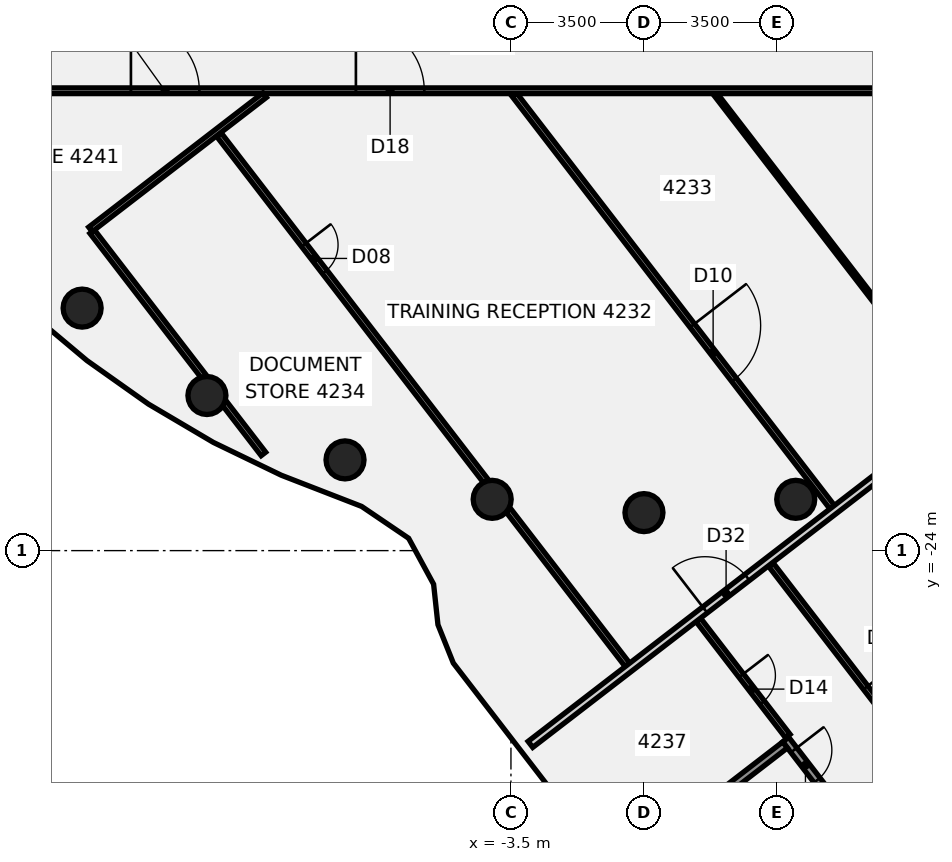
"""IFC4 building model, lengths in metres.
Left out: names, types, materials, properties, quantities, classifications, styles, units other than length and angle.
Written with IfcOpenShell. Run it as: python <this file> out.ifc"""

import sys

from ifc_helpers import new_model, si_unit, direction, frame, frame_2d, origin, origin_2d, place, context, subcontext, project, spatial, rectangle, circle, extrude, element, fill, save


model = new_model("IFC4")
c1 = context("Model", 3, precision=1e-05, world=origin(), true_north=direction((0.0, 1.0)))
c2 = subcontext(c1, "Body", "Model", "MODEL_VIEW")
j1 = project(units=[si_unit("LENGTHUNIT", "METRE"), si_unit("PLANEANGLEUNIT", "RADIAN")], contexts=[c1])
p1 = place(None, origin())
s1 = spatial("IfcSite", under=j1, at=p1, CompositionType="ELEMENT")
p2 = place(p1, origin())
s2 = spatial("IfcBuilding", under=s1, at=p2, CompositionType="ELEMENT")
p3 = place(p2, frame((0.0, 0.0, 170.5)))
s3 = spatial("IfcBuildingStorey", under=s2, at=p3, CompositionType="ELEMENT", Elevation=170.5)
for number, where, z_axis, x_axis in (
    (1, (-14.784, -17.619, -0.14), (0.0, 0.0, 1.0), (1.0, 0.0, 0.0)),
    (2, (-11.5, -19.919, -0.14), (0.0, 0.0, 1.0), (1.0, 0.0, 0.0)),
    (3, (-7.866, -21.613, -0.14), (0.0, 0.0, 1.0), (1.0, 0.0, 0.0)),
    (4, (-3.994, -22.651, -0.14), (0.0, 0.0, 1.0), (1.0, 0.0, 0.0)),
    (5, (0.0, -23.0, -0.14), (0.0, 0.0, 1.0), (1.0, 0.0, 0.0)),
    (6, (3.994, -22.651, -0.14), (0.0, 0.0, 1.0), (1.0, 0.0, 0.0)),
):
    element("IfcColumn", number, at=place(p3, frame(where, z_axis=z_axis, x_axis=x_axis)), inside=s3, PredefinedType="COLUMN", context=c2, shape_type="SweptSolid", body=[
        extrude(circle(Radius=0.5, at=origin_2d()), origin(), (0.0, 0.0, 1.0), 3.75),
    ])
p4 = place(p3, frame((-14.519, -15.607, 0.0), z_axis=(0.0, 0.0, 1.0), x_axis=(0.610346471548, -0.792134574848, 0.0)))
e7 = element("IfcWall", 7, at=p4, inside=s3, PredefinedType="PARTITIONING", context=c2, shape_type="SweptSolid", body=[
    extrude(rectangle(XDim=4.824, YDim=0.15, at=frame_2d((2.412, 0.0))), origin(), (0.0, 0.0, 1.0), 3.01),
])
p5 = place(p3, frame((-11.044, -20.118, 0.0), z_axis=(0.0, 0.0, 1.0), x_axis=(0.610360453682, -0.792123801297, 0.0)))
e8 = element("IfcWall", 8, at=p5, inside=s3, PredefinedType="PARTITIONING", context=c2, shape_type="SweptSolid", body=[
    extrude(rectangle(XDim=1.688, YDim=0.15, at=frame_2d((0.844, 0.0))), origin(), (0.0, 0.0, 1.0), 3.01),
])
p6 = place(p3, frame((-11.189, -13.048, 0.0), z_axis=(0.0, 0.0, 1.0), x_axis=(0.610349031446, -0.792132602418, 0.0)))
e9 = element("IfcWall", 9, at=p6, inside=s3, PredefinedType="PARTITIONING", context=c2, shape_type="SweptSolid", body=[
    extrude(rectangle(XDim=11.531, YDim=0.15, at=frame_2d((5.766, 0.0))), origin(), (0.0, 0.0, 1.0), 3.01),
])
p7 = place(p6, frame((3.67, 0.0, 0.0)))
e10 = element("IfcOpeningElement", 10, at=p7, cuts=e9, PredefinedType="OPENING", context=c2, shape_type="SweptSolid", body=[
    extrude(rectangle(XDim=0.9, YDim=2.1, at=frame_2d((0.45, 1.05))), frame((0.0, 0.085, 0.0), z_axis=(0.0, -1.0, 0.0), x_axis=(1.0, 0.0, 0.0)), (0.0, 0.0, 1.0), 0.17),
])
p8 = place(p3, frame((-3.576, -22.929, 0.0), z_axis=(0.0, 0.0, 1.0), x_axis=(0.610318133702, -0.792156408593, 0.0)))
e11 = element("IfcWall", 11, at=p8, inside=s3, PredefinedType="PARTITIONING", context=c2, shape_type="SweptSolid", body=[
    extrude(rectangle(XDim=5.146, YDim=0.15, at=frame_2d((2.573, 0.0))), origin(), (0.0, 0.0, 1.0), 3.01),
])
p9 = place(p3, frame((-3.411, -12.003, 0.0), z_axis=(0.0, 0.0, 1.0), x_axis=(0.610364170435, -0.792120937388, 0.0)))
e12 = element("IfcWall", 12, at=p9, inside=s3, PredefinedType="PARTITIONING", context=c2, shape_type="SweptSolid", body=[
    extrude(rectangle(XDim=13.701, YDim=0.15, at=frame_2d((6.851, 0.0))), origin(), (0.0, 0.0, 1.0), 3.01),
])
p10 = place(p9, frame((7.67, 0.0, 0.0)))
e13 = element("IfcOpeningElement", 13, at=p10, cuts=e12, PredefinedType="OPENING", context=c2, shape_type="SweptSolid", body=[
    extrude(rectangle(XDim=1.8, YDim=2.1, at=frame_2d((0.9, 1.05))), frame((0.0, 0.085, 0.0), z_axis=(0.0, -1.0, 0.0), x_axis=(1.0, 0.0, 0.0)), (0.0, 0.0, 1.0), 0.17),
])
p11 = place(p3, frame((1.43, -25.822, 0.0), z_axis=(0.0, 0.0, 1.0), x_axis=(0.610373930516, -0.792113416719, 0.0)))
e14 = element("IfcWall", 14, at=p11, inside=s3, PredefinedType="PARTITIONING", context=c2, shape_type="SweptSolid", body=[
    extrude(rectangle(XDim=3.859, YDim=0.15, at=frame_2d((1.93, 0.0))), origin(), (0.0, 0.0, 1.0), 3.01),
])
p12 = place(p11, frame((1.85, 0.0, 0.0)))
e15 = element("IfcOpeningElement", 15, at=p12, cuts=e14, PredefinedType="OPENING", context=c2, shape_type="SweptSolid", body=[
    extrude(rectangle(XDim=0.9, YDim=2.1, at=frame_2d((0.45, 1.05))), frame((0.0, 0.085, 0.0), z_axis=(0.0, -1.0, 0.0), x_axis=(1.0, 0.0, 0.0)), (0.0, 0.0, 1.0), 0.17),
])
p13 = place(p3, frame((1.879, -11.987, 0.0), z_axis=(0.0, 0.0, 1.0), x_axis=(0.610355549793, -0.792127579899, 0.0)))
e16 = element("IfcWall", 16, at=p13, inside=s3, PredefinedType="PARTITIONING", context=c2, shape_type="SweptSolid", body=[
    extrude(rectangle(XDim=13.994, YDim=0.1, at=frame_2d((6.997, 0.0))), origin(), (0.0, 0.0, 1.0), 3.01),
])
p14 = place(p3, frame((3.343, -24.373, 0.0), z_axis=(0.0, 0.0, 1.0), x_axis=(0.6103058516, -0.792165871205, 0.0)))
e17 = element("IfcWall", 17, at=p14, inside=s3, PredefinedType="PARTITIONING", context=c2, shape_type="SweptSolid", body=[
    extrude(rectangle(XDim=13.3, YDim=0.15, at=frame_2d((6.65, 0.0))), origin(), (0.0, 0.0, 1.0), 3.01),
])
p15 = place(p14, frame((4.08, 0.0, 0.0)))
e18 = element("IfcOpeningElement", 18, at=p15, cuts=e17, PredefinedType="OPENING", context=c2, shape_type="SweptSolid", body=[
    extrude(rectangle(XDim=1.8, YDim=2.1, at=frame_2d((0.9, 1.05))), frame((0.0, 0.085, 0.0), z_axis=(0.0, -1.0, 0.0), x_axis=(1.0, 0.0, 0.0)), (0.0, 0.0, 1.0), 0.17),
])
p16 = place(p3, frame((-17.1, -11.9, 0.0), z_axis=(0.0, 0.0, 1.0), x_axis=(1.0, 0.0, 0.0)))
e19 = element("IfcWall", 19, at=p16, inside=s3, PredefinedType="PARTITIONING", context=c2, shape_type="SweptSolid", body=[
    extrude(rectangle(XDim=34.165, YDim=0.15, at=frame_2d((17.083, 0.0))), origin(), (0.0, 0.0, 1.0), 3.01),
])
p17 = place(p16, frame((9.52, 0.0, 0.0)))
e20 = element("IfcOpeningElement", 20, at=p17, cuts=e19, PredefinedType="OPENING", context=c2, shape_type="SweptSolid", body=[
    extrude(rectangle(XDim=1.8, YDim=2.1, at=frame_2d((0.9, 1.05))), frame((0.0, 0.085, 0.0), z_axis=(0.0, -1.0, 0.0), x_axis=(1.0, 0.0, 0.0)), (0.0, 0.0, 1.0), 0.17),
])
p18 = place(p16, frame((3.6, 0.0, 0.0)))
e21 = element("IfcOpeningElement", 21, at=p18, cuts=e19, PredefinedType="OPENING", context=c2, shape_type="SweptSolid", body=[
    extrude(rectangle(XDim=1.8, YDim=2.1, at=frame_2d((0.9, 1.05))), frame((0.0, 0.085, 0.0), z_axis=(0.0, -1.0, 0.0), x_axis=(1.0, 0.0, 0.0)), (0.0, 0.0, 1.0), 0.17),
])
p19 = place(p16, frame((23.862, 0.0, 0.0)))
e22 = element("IfcOpeningElement", 22, at=p19, cuts=e19, PredefinedType="OPENING", context=c2, shape_type="SweptSolid", body=[
    extrude(rectangle(XDim=1.8, YDim=2.1, at=frame_2d((0.9, 1.05))), frame((0.0, 0.085, 0.0), z_axis=(0.0, -1.0, 0.0), x_axis=(1.0, 0.0, 0.0)), (0.0, 0.0, 1.0), 0.17),
])
p20 = place(p3, frame((-14.565, -15.548, 0.0), z_axis=(0.0, 0.0, 1.0), x_axis=(0.792167406266, 0.610303859114, 0.0)))
e23 = element("IfcWall", 23, at=p20, inside=s3, PredefinedType="PARTITIONING", context=c2, shape_type="SweptSolid", body=[
    extrude(rectangle(XDim=5.787, YDim=0.15, at=frame_2d((2.894, 0.0))), origin(), (0.0, 0.0, 1.0), 3.01),
])
p21 = place(p3, frame((-2.988, -29.099, 0.0), z_axis=(0.0, 0.0, 1.0), x_axis=(0.792235021712, 0.610216084983, 0.0)))
e24 = element("IfcWall", 24, at=p21, inside=s3, PredefinedType="PARTITIONING", context=c2, shape_type="SweptSolid", body=[
    extrude(rectangle(XDim=14.239, YDim=0.2, at=frame_2d((7.12, 0.0))), origin(), (0.0, 0.0, 1.0), 3.01),
])
p22 = place(p21, frame((5.799, 0.0, 0.0)))
e25 = element("IfcOpeningElement", 25, at=p22, cuts=e24, PredefinedType="OPENING", context=c2, shape_type="SweptSolid", body=[
    extrude(rectangle(XDim=1.4, YDim=2.1, at=frame_2d((0.7, 1.05))), frame((0.0, 0.11, 0.0), z_axis=(0.0, -1.0, 0.0), x_axis=(1.0, 0.0, 0.0)), (0.0, 0.0, 1.0), 0.22),
])
p23 = place(p3, frame((3.731, -28.972, -0.14), z_axis=(0.0, 0.0, 1.0), x_axis=(0.610321648921, -0.792153700274, 0.0)))
e26 = element("IfcWall", 26, at=p23, inside=s3, PredefinedType="SHEAR", context=c2, shape_type="SweptSolid", body=[
    extrude(rectangle(XDim=6.7, YDim=0.2, at=frame_2d((3.35, 0.0))), origin(), (0.0, 0.0, 1.0), 3.15),
])
p24 = place(p23, frame((0.35, 0.0, 0.0)))
e27 = element("IfcOpeningElement", 27, at=p24, cuts=e26, PredefinedType="OPENING", context=c2, shape_type="SweptSolid", body=[
    extrude(rectangle(XDim=1.0, YDim=2.1, at=frame_2d((0.5, 1.05))), frame((0.0, 0.11, 0.0), z_axis=(0.0, -1.0, 0.0), x_axis=(1.0, 0.0, 0.0)), (0.0, 0.0, 1.0), 0.22),
])
p25 = place(p3, frame((1.177, -31.065, -0.14), z_axis=(0.0, 0.0, 1.0), x_axis=(0.792178482979, 0.610289481398, 0.0)))
e28 = element("IfcWall", 28, at=p25, inside=s3, PredefinedType="SHEAR", context=c2, shape_type="SweptSolid", body=[
    extrude(rectangle(XDim=3.2, YDim=0.2, at=frame_2d((1.6, 0.0))), origin(), (0.0, 0.0, 1.0), 3.15),
])
p26 = place(p7, frame((0.9, 0.0, 0.0), z_axis=(0.0, 0.0, 1.0), x_axis=(-1.0, 0.0, 0.0)))
e29 = element("IfcDoor", 29, at=p26, inside=s3, OperationType="SINGLE_SWING_LEFT", PredefinedType="DOOR", context=c2, shape_type="SweptSolid", body=[
    extrude(rectangle(XDim=0.9, YDim=2.1, at=frame_2d((0.45, 1.05))), frame((0.0, 0.025, 0.0), z_axis=(0.0, -1.0, 0.0), x_axis=(1.0, 0.0, 0.0)), (0.0, 0.0, 1.0), 0.05),
])
fill(e10, e29)
p27 = place(p10, origin())
e30 = element("IfcDoor", 30, at=p27, inside=s3, OperationType="DOUBLE_DOOR_SINGLE_SWING", PredefinedType="DOOR", context=c2, shape_type="SweptSolid", body=[
    extrude(rectangle(XDim=1.8, YDim=2.1, at=frame_2d((0.9, 1.05))), frame((0.0, 0.025, 0.0), z_axis=(0.0, -1.0, 0.0), x_axis=(1.0, 0.0, 0.0)), (0.0, 0.0, 1.0), 0.05),
])
fill(e13, e30)
p28 = place(p12, frame((0.9, 0.0, 0.0), z_axis=(0.0, 0.0, 1.0), x_axis=(-1.0, 0.0, 0.0)))
e31 = element("IfcDoor", 31, at=p28, inside=s3, OperationType="SINGLE_SWING_RIGHT", PredefinedType="DOOR", context=c2, shape_type="SweptSolid", body=[
    extrude(rectangle(XDim=0.9, YDim=2.1, at=frame_2d((0.45, 1.05))), frame((0.0, 0.025, 0.0), z_axis=(0.0, -1.0, 0.0), x_axis=(1.0, 0.0, 0.0)), (0.0, 0.0, 1.0), 0.05),
])
fill(e15, e31)
p29 = place(p15, frame((1.8, 0.0, 0.0), z_axis=(0.0, 0.0, 1.0), x_axis=(-1.0, 0.0, 0.0)))
e32 = element("IfcDoor", 32, at=p29, inside=s3, OperationType="DOUBLE_DOOR_SINGLE_SWING", PredefinedType="DOOR", context=c2, shape_type="SweptSolid", body=[
    extrude(rectangle(XDim=1.8, YDim=2.1, at=frame_2d((0.9, 1.05))), frame((0.0, 0.025, 0.0), z_axis=(0.0, -1.0, 0.0), x_axis=(1.0, 0.0, 0.0)), (0.0, 0.0, 1.0), 0.05),
])
fill(e18, e32)
p30 = place(p17, origin())
e33 = element("IfcDoor", 33, at=p30, inside=s3, OperationType="DOUBLE_DOOR_SINGLE_SWING", PredefinedType="DOOR", context=c2, shape_type="SweptSolid", body=[
    extrude(rectangle(XDim=1.8, YDim=2.1, at=frame_2d((0.9, 1.05))), frame((0.0, 0.025, 0.0), z_axis=(0.0, -1.0, 0.0), x_axis=(1.0, 0.0, 0.0)), (0.0, 0.0, 1.0), 0.05),
])
fill(e20, e33)
p31 = place(p18, frame((1.8, 0.0, 0.0), z_axis=(0.0, 0.0, 1.0), x_axis=(-1.0, 0.0, 0.0)))
e34 = element("IfcDoor", 34, at=p31, inside=s3, OperationType="DOUBLE_DOOR_SINGLE_SWING", PredefinedType="DOOR", context=c2, shape_type="SweptSolid", body=[
    extrude(rectangle(XDim=1.8, YDim=2.1, at=frame_2d((0.9, 1.05))), frame((0.0, 0.025, 0.0), z_axis=(0.0, -1.0, 0.0), x_axis=(1.0, 0.0, 0.0)), (0.0, 0.0, 1.0), 0.05),
])
fill(e21, e34)
p32 = place(p22, origin())
e35 = element("IfcDoor", 35, at=p32, inside=s3, OperationType="DOUBLE_DOOR_SINGLE_SWING", PredefinedType="DOOR", context=c2, shape_type="SweptSolid", body=[
    extrude(rectangle(XDim=1.4, YDim=2.1, at=frame_2d((0.7, 1.05))), frame((0.0, 0.025, 0.0), z_axis=(0.0, -1.0, 0.0), x_axis=(1.0, 0.0, 0.0)), (0.0, 0.0, 1.0), 0.05),
])
fill(e25, e35)
p33 = place(p24, origin())
e36 = element("IfcDoor", 36, at=p33, inside=s3, OperationType="SINGLE_SWING_LEFT", PredefinedType="DOOR", context=c2, shape_type="SweptSolid", body=[
    extrude(rectangle(XDim=1.0, YDim=2.1, at=frame_2d((0.5, 1.05))), frame((0.0, 0.025, 0.0), z_axis=(0.0, -1.0, 0.0), x_axis=(1.0, 0.0, 0.0)), (0.0, 0.0, 1.0), 0.05),
])
fill(e27, e36)
save(model, sys.argv[1])
